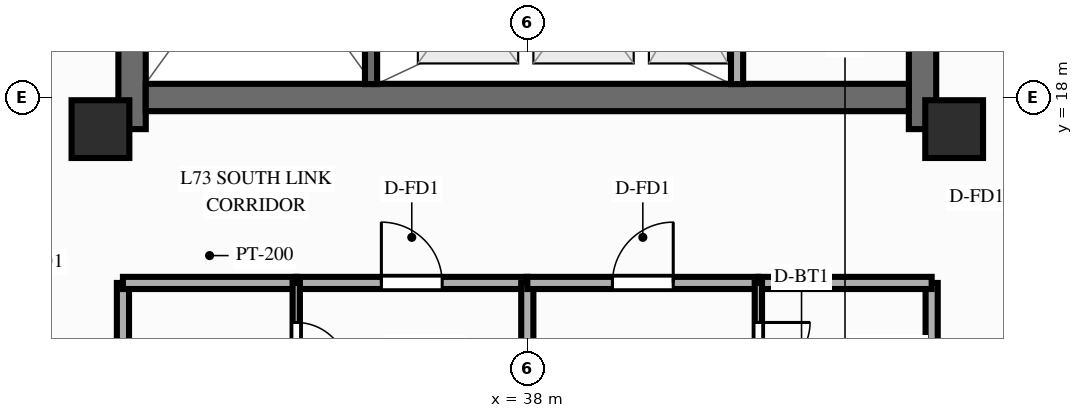
"""IFC4 building model, lengths in metres.
Left out: names, types, materials, properties, quantities, classifications, styles, units other than length and angle.
Written with IfcOpenShell. Run it as: python <this file> out.ifc"""

import sys

from ifc_helpers import new_model, si_unit, direction, frame, frame_2d, origin, origin_2d, place, context, subcontext, project, spatial, rectangle, extrude, source, transform, mapped, element, fill, save


model = new_model("IFC4")
c1 = context("Model", 3, precision=1e-05, world=origin(), true_north=direction((0.0, 1.0)))
c2 = subcontext(c1, "Body", "Model", "MODEL_VIEW")
j1 = project(units=[si_unit("LENGTHUNIT", "METRE"), si_unit("PLANEANGLEUNIT", "RADIAN")], contexts=[c1])
p1 = place(None, origin())
s1 = spatial("IfcSite", under=j1, at=p1, CompositionType="ELEMENT")
p2 = place(p1, origin())
s2 = spatial("IfcBuilding", under=s1, at=p2, CompositionType="ELEMENT")
p3 = place(p2, frame((0.0, 0.0, 236.1)))
s3 = spatial("IfcBuildingStorey", under=s2, at=p3, CompositionType="ELEMENT", Elevation=236.1)
p4 = place(p3, frame((31.5, 17.48, 0.0), z_axis=(0.0, 0.0, 1.0), x_axis=(0.0, 1.0, 0.0)))
e1 = element("IfcWall", 1, at=p4, inside=s3, PredefinedType="SHEAR", context=c2, shape_type="SweptSolid", body=[
    extrude(rectangle(XDim=19.04, YDim=0.45, at=frame_2d((9.52, 0.0))), origin(), (0.0, 0.0, 1.0), 3.9),
])
p5 = place(p4, frame((6.32, 0.0, 0.0)))
e2 = element("IfcOpeningElement", 2, at=p5, cuts=e1, PredefinedType="OPENING", context=c2, shape_type="SweptSolid", body=[
    extrude(rectangle(XDim=1.1, YDim=2.15, at=frame_2d((0.55, 1.075))), frame((0.0, 0.237, 0.0), z_axis=(0.0, -1.0, 0.0), x_axis=(1.0, 0.0, 0.0)), (0.0, 0.0, 1.0), 0.474),
])
p6 = place(p3, frame((44.5, 17.48, 0.0), z_axis=(0.0, 0.0, 1.0), x_axis=(0.0, 1.0, 0.0)))
e3 = element("IfcWall", 3, at=p6, inside=s3, PredefinedType="SHEAR", context=c2, shape_type="SweptSolid", body=[
    extrude(rectangle(XDim=19.04, YDim=0.45, at=frame_2d((9.52, 0.0))), origin(), (0.0, 0.0, 1.0), 3.9),
])
p7 = place(p6, frame((12.67, 0.0, 0.0), z_axis=(0.0, 0.0, 1.0), x_axis=(-1.0, 0.0, 0.0)))
e4 = element("IfcOpeningElement", 4, at=p7, cuts=e3, PredefinedType="OPENING", context=c2, shape_type="SweptSolid", body=[
    extrude(rectangle(XDim=1.1, YDim=2.15, at=frame_2d((0.55, 1.075))), frame((0.0, 0.237, 0.0), z_axis=(0.0, -1.0, 0.0), x_axis=(1.0, 0.0, 0.0)), (0.0, 0.0, 1.0), 0.474),
])
p8 = place(p3, frame((31.725, 18.0, 0.0), z_axis=(0.0, 0.0, 1.0), x_axis=(1.0, 0.0, 0.0)))
e5 = element("IfcWall", 5, at=p8, inside=s3, PredefinedType="SHEAR", context=c2, shape_type="SweptSolid", body=[
    extrude(rectangle(XDim=12.55, YDim=0.45, at=frame_2d((6.275, 0.0))), origin(), (0.0, 0.0, 1.0), 3.9),
])
m1 = source(origin(), c2, "Body", "SweptSolid", [
    extrude(rectangle(XDim=0.95, YDim=0.95, at=origin_2d()), origin(), (0.0, 0.0, 1.0), 3.9),
])
for number, where, z_axis, x_axis in (
    (6, (30.98, 17.48, 0.0), (0.0, 0.0, 1.0), (1.0, 0.0, 0.0)),
    (7, (45.02, 17.48, 0.0), (0.0, 0.0, 1.0), (1.0, 0.0, 0.0)),
):
    element("IfcColumn", number, at=place(p3, frame(where, z_axis=z_axis, x_axis=x_axis)), inside=s3, PredefinedType="COLUMN", context=c2, shape_type="MappedRepresentation", body=[
        mapped(m1, transform((0.0, 0.0, 0.0), scale=1.0)),
    ])
p9 = place(p3, frame((41.45, 18.22, 0.0), z_axis=(0.0, 0.0, 1.0), x_axis=(0.0, 1.0, 0.0)))
e8 = element("IfcWall", 8, at=p9, inside=s3, PredefinedType="PARTITIONING", context=c2, shape_type="SweptSolid", body=[
    extrude(rectangle(XDim=2.96, YDim=0.2, at=frame_2d((1.48, 0.0))), origin(), (0.0, 0.0, 1.0), 3.56),
])
p10 = place(p3, frame((35.43, 18.22, 0.0), z_axis=(0.0, 0.0, 1.0), x_axis=(0.0, 1.0, 0.0)))
e9 = element("IfcWall", 9, at=p10, inside=s3, PredefinedType="SOLIDWALL", context=c2, shape_type="SweptSolid", body=[
    extrude(rectangle(XDim=7.22, YDim=0.2, at=frame_2d((3.61, 0.0))), origin(), (0.0, 0.0, 1.0), 3.69),
])
p11 = place(p10, frame((6.68, 0.0, 0.0), z_axis=(0.0, 0.0, 1.0), x_axis=(-1.0, 0.0, 0.0)))
e10 = element("IfcOpeningElement", 10, at=p11, cuts=e9, PredefinedType="OPENING", context=c2, shape_type="SweptSolid", body=[
    extrude(rectangle(XDim=1.1, YDim=2.15, at=frame_2d((0.55, 1.075))), frame((0.0, 0.112, 0.0), z_axis=(0.0, -1.0, 0.0), x_axis=(1.0, 0.0, 0.0)), (0.0, 0.0, 1.0), 0.224),
])
for number, where, z_axis, x_axis in (
    (11, (31.35, 14.95, 0.0), (0.0, 0.0, 1.0), (0.0, -1.0, 0.0)),
    (12, (44.65, 14.95, 0.0), (0.0, 0.0, 1.0), (0.0, -1.0, 0.0)),
):
    element("IfcWall", number, at=place(p3, frame(where, z_axis=z_axis, x_axis=x_axis)), inside=s3, PredefinedType="PARTITIONING", context=c2, shape_type="SweptSolid", body=[
        extrude(rectangle(XDim=8.8, YDim=0.2, at=frame_2d((4.4, 0.0))), origin(), (0.0, 0.0, 1.0), 2.44),
    ])
p12 = place(p3, frame((31.35, 14.95, 0.0), z_axis=(0.0, 0.0, 1.0), x_axis=(1.0, 0.0, 0.0)))
e13 = element("IfcWall", 13, at=p12, inside=s3, PredefinedType="PARTITIONING", context=c2, shape_type="SweptSolid", body=[
    extrude(rectangle(XDim=2.85, YDim=0.2, at=frame_2d((1.425, 0.0))), origin(), (0.0, 0.0, 1.0), 3.56),
])
p13 = place(p3, frame((34.2, 14.95, 0.0), z_axis=(0.0, 0.0, 1.0), x_axis=(1.0, 0.0, 0.0)))
e14 = element("IfcWall", 14, at=p13, inside=s3, PredefinedType="PARTITIONING", context=c2, shape_type="SweptSolid", body=[
    extrude(rectangle(XDim=3.8, YDim=0.2, at=frame_2d((1.9, 0.0))), origin(), (0.0, 0.0, 1.0), 3.56),
])
p14 = place(p13, frame((1.4, 0.0, 0.0)))
e15 = element("IfcOpeningElement", 15, at=p14, cuts=e14, PredefinedType="OPENING", context=c2, shape_type="SweptSolid", body=[
    extrude(rectangle(XDim=1.0, YDim=2.15, at=frame_2d((0.5, 1.075))), frame((0.0, 0.112, 0.0), z_axis=(0.0, -1.0, 0.0), x_axis=(1.0, 0.0, 0.0)), (0.0, 0.0, 1.0), 0.224),
])
p15 = place(p3, frame((34.2, 14.95, 0.0), z_axis=(0.0, 0.0, 1.0), x_axis=(0.0, -1.0, 0.0)))
e16 = element("IfcWall", 16, at=p15, inside=s3, PredefinedType="PARTITIONING", context=c2, shape_type="SweptSolid", body=[
    extrude(rectangle(XDim=2.15, YDim=0.12, at=frame_2d((1.075, 0.0))), origin(), (0.0, 0.0, 1.0), 3.56),
])
p16 = place(p15, frame((0.65, 0.0, 0.0)))
e17 = element("IfcOpeningElement", 17, at=p16, cuts=e16, PredefinedType="OPENING", context=c2, shape_type="SweptSolid", body=[
    extrude(rectangle(XDim=0.85, YDim=2.05, at=frame_2d((0.425, 1.025))), frame((0.0, 0.072, 0.0), z_axis=(0.0, -1.0, 0.0), x_axis=(1.0, 0.0, 0.0)), (0.0, 0.0, 1.0), 0.144),
])
p17 = place(p3, frame((38.0, 14.95, 0.0), z_axis=(0.0, 0.0, 1.0), x_axis=(0.0, -1.0, 0.0)))
e18 = element("IfcWall", 18, at=p17, inside=s3, PredefinedType="PARTITIONING", context=c2, shape_type="SweptSolid", body=[
    extrude(rectangle(XDim=8.8, YDim=0.2, at=frame_2d((4.4, 0.0))), origin(), (0.0, 0.0, 1.0), 3.56),
])
p18 = place(p3, frame((38.0, 14.95, 0.0), z_axis=(0.0, 0.0, 1.0), x_axis=(1.0, 0.0, 0.0)))
e19 = element("IfcWall", 19, at=p18, inside=s3, PredefinedType="PARTITIONING", context=c2, shape_type="SweptSolid", body=[
    extrude(rectangle(XDim=3.8, YDim=0.2, at=frame_2d((1.9, 0.0))), origin(), (0.0, 0.0, 1.0), 3.56),
])
p19 = place(p18, frame((1.4, 0.0, 0.0)))
e20 = element("IfcOpeningElement", 20, at=p19, cuts=e19, PredefinedType="OPENING", context=c2, shape_type="SweptSolid", body=[
    extrude(rectangle(XDim=1.0, YDim=2.15, at=frame_2d((0.5, 1.075))), frame((0.0, 0.112, 0.0), z_axis=(0.0, -1.0, 0.0), x_axis=(1.0, 0.0, 0.0)), (0.0, 0.0, 1.0), 0.224),
])
p20 = place(p3, frame((41.8, 14.95, 0.0), z_axis=(0.0, 0.0, 1.0), x_axis=(1.0, 0.0, 0.0)))
e21 = element("IfcWall", 21, at=p20, inside=s3, PredefinedType="PARTITIONING", context=c2, shape_type="SweptSolid", body=[
    extrude(rectangle(XDim=2.85, YDim=0.2, at=frame_2d((1.425, 0.0))), origin(), (0.0, 0.0, 1.0), 3.56),
])
p21 = place(p3, frame((41.8, 14.95, 0.0), z_axis=(0.0, 0.0, 1.0), x_axis=(0.0, -1.0, 0.0)))
e22 = element("IfcWall", 22, at=p21, inside=s3, PredefinedType="PARTITIONING", context=c2, shape_type="SweptSolid", body=[
    extrude(rectangle(XDim=2.15, YDim=0.12, at=frame_2d((1.075, 0.0))), origin(), (0.0, 0.0, 1.0), 3.56),
])
p22 = place(p21, frame((0.65, 0.0, 0.0)))
e23 = element("IfcOpeningElement", 23, at=p22, cuts=e22, PredefinedType="OPENING", context=c2, shape_type="SweptSolid", body=[
    extrude(rectangle(XDim=0.85, YDim=2.05, at=frame_2d((0.425, 1.025))), frame((0.0, 0.072, 0.0), z_axis=(0.0, -1.0, 0.0), x_axis=(1.0, 0.0, 0.0)), (0.0, 0.0, 1.0), 0.144),
])
m2 = source(origin(), c2, "Body", "SweptSolid", [
    extrude(rectangle(XDim=1.0, YDim=2.15, at=frame_2d((0.5, 1.075))), frame((0.0, 0.025, 0.0), z_axis=(0.0, -1.0, 0.0), x_axis=(1.0, 0.0, 0.0)), (0.0, 0.0, 1.0), 0.05),
])
p23 = place(p14, origin())
e24 = element("IfcDoor", 24, at=p23, inside=s3, OperationType="SINGLE_SWING_LEFT", PredefinedType="DOOR", context=c2, shape_type="MappedRepresentation", body=[
    mapped(m2, transform((0.0, 0.0, 0.0), scale=1.0)),
])
fill(e15, e24)
m3 = source(origin(), c2, "Body", "SweptSolid", [
    extrude(rectangle(XDim=0.85, YDim=2.05, at=frame_2d((0.425, 1.025))), frame((0.0, 0.025, 0.0), z_axis=(0.0, -1.0, 0.0), x_axis=(1.0, 0.0, 0.0)), (0.0, 0.0, 1.0), 0.05),
])
p24 = place(p16, origin())
e25 = element("IfcDoor", 25, at=p24, inside=s3, OperationType="SINGLE_SWING_RIGHT", PredefinedType="DOOR", context=c2, shape_type="MappedRepresentation", body=[
    mapped(m3, transform((0.0, 0.0, 0.0), scale=1.0)),
])
fill(e17, e25)
p25 = place(p19, origin())
e26 = element("IfcDoor", 26, at=p25, inside=s3, OperationType="SINGLE_SWING_RIGHT", PredefinedType="DOOR", context=c2, shape_type="MappedRepresentation", body=[
    mapped(m2, transform((0.0, 0.0, 0.0), scale=1.0)),
])
fill(e20, e26)
p26 = place(p22, origin())
e27 = element("IfcDoor", 27, at=p26, inside=s3, OperationType="SINGLE_SWING_LEFT", PredefinedType="DOOR", context=c2, shape_type="MappedRepresentation", body=[
    mapped(m3, transform((0.0, 0.0, 0.0), scale=1.0)),
])
fill(e23, e27)
save(model, sys.argv[1])
